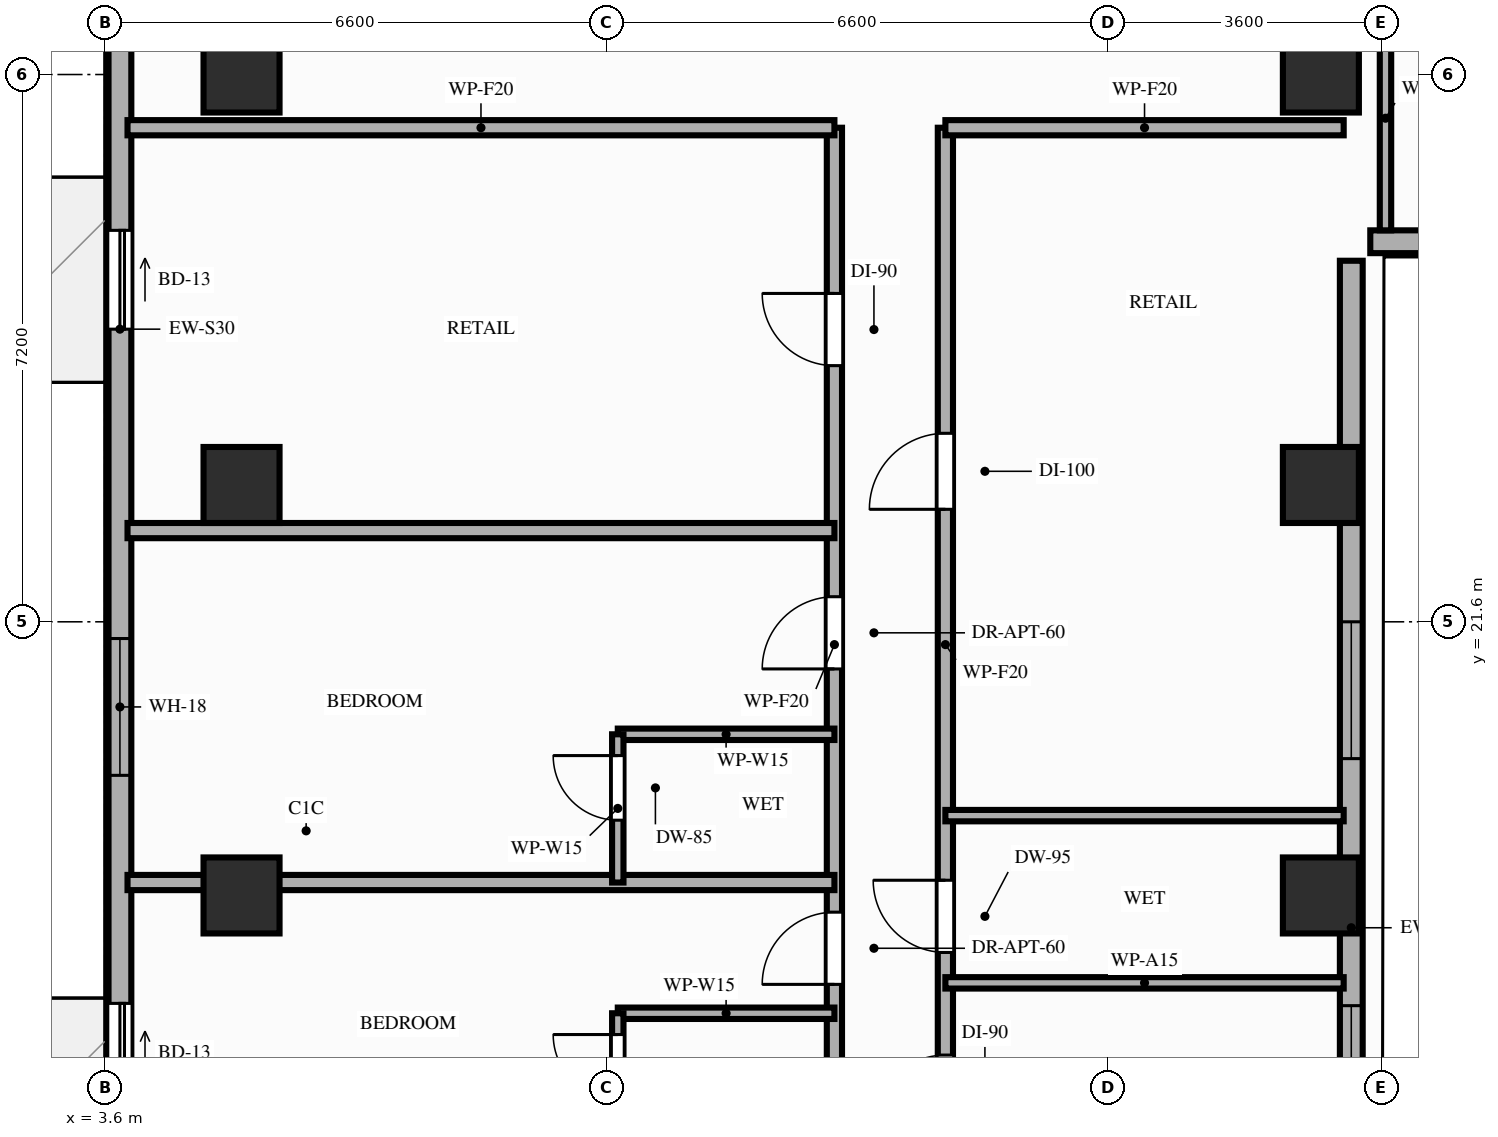
"""IFC4 building model, lengths in metres.
Left out: names, types, materials, properties, quantities, classifications, styles, units other than length and angle.
Written with IfcOpenShell. Run it as: python <this file> out.ifc"""

import sys

from ifc_helpers import new_model, si_unit, direction, frame, frame_2d, origin, origin_2d, place, context, subcontext, project, spatial, rectangle, extrude, element, fill, save


model = new_model("IFC4")
c1 = context("Model", 3, precision=1e-05, world=origin(), true_north=direction((0.0, 1.0)))
c2 = subcontext(c1, "Body", "Model", "MODEL_VIEW")
j1 = project(units=[si_unit("LENGTHUNIT", "METRE"), si_unit("PLANEANGLEUNIT", "RADIAN")], contexts=[c1])
p1 = place(None, origin())
s1 = spatial("IfcSite", under=j1, at=p1, CompositionType="ELEMENT")
p2 = place(p1, origin())
s2 = spatial("IfcBuilding", under=s1, at=p2, CompositionType="ELEMENT")
p3 = place(p2, frame((0.0, 0.0, 136.2)))
s3 = spatial("IfcBuildingStorey", under=s2, at=p3, CompositionType="ELEMENT", Elevation=136.2)
for number, where, z_axis, x_axis in (
    (1, (5.4, 18.0, 0.0), (0.0, 0.0, 1.0), (1.0, 0.0, 0.0)),
    (2, (19.6, 18.0, 0.0), (0.0, 0.0, 1.0), (1.0, 0.0, 0.0)),
    (3, (5.4, 23.4, 0.0), (0.0, 0.0, 1.0), (1.0, 0.0, 0.0)),
    (4, (19.6, 23.4, 0.0), (0.0, 0.0, 1.0), (1.0, 0.0, 0.0)),
    (5, (5.4, 28.8, 0.0), (0.0, 0.0, 1.0), (1.0, 0.0, 0.0)),
    (6, (19.6, 28.8, 0.0), (0.0, 0.0, 1.0), (1.0, 0.0, 0.0)),
):
    element("IfcColumn", number, at=place(p3, frame(where, z_axis=z_axis, x_axis=x_axis)), inside=s3, PredefinedType="COLUMN", context=c2, shape_type="SweptSolid", body=[
        extrude(rectangle(XDim=1.0, YDim=1.0, at=origin_2d()), origin(), (0.0, 0.0, 1.0), 3.2),
    ])
p4 = place(p3, frame((3.8, 42.1, 0.0), z_axis=(0.0, 0.0, 1.0), x_axis=(0.0, -1.0, 0.0)))
e7 = element("IfcWall", 7, at=p4, inside=s3, PredefinedType="STANDARD", context=c2, shape_type="SweptSolid", body=[
    extrude(rectangle(XDim=33.3, YDim=0.3, at=frame_2d((16.65, 0.0))), origin(), (0.0, 0.0, 1.0), 2.71),
])
p5 = place(p4, frame((25.52, 0.0, 0.0)))
e8 = element("IfcOpeningElement", 8, at=p5, cuts=e7, PredefinedType="OPENING", context=c2, shape_type="SweptSolid", body=[
    extrude(rectangle(XDim=1.3, YDim=2.08, at=frame_2d((0.65, 1.04))), frame((0.0, 0.16, 0.0), z_axis=(0.0, -1.0, 0.0), x_axis=(1.0, 0.0, 0.0)), (0.0, 0.0, 1.0), 0.32),
])
p6 = place(p4, frame((15.35, 0.0, 0.0)))
e9 = element("IfcOpeningElement", 9, at=p6, cuts=e7, PredefinedType="OPENING", context=c2, shape_type="SweptSolid", body=[
    extrude(rectangle(XDim=1.3, YDim=2.08, at=frame_2d((0.65, 1.04))), frame((0.0, 0.16, 0.0), z_axis=(0.0, -1.0, 0.0), x_axis=(1.0, 0.0, 0.0)), (0.0, 0.0, 1.0), 0.32),
])
p7 = place(p4, frame((20.72, 0.0, 0.85)))
e10 = element("IfcOpeningElement", 10, at=p7, cuts=e7, PredefinedType="OPENING", context=c2, shape_type="SweptSolid", body=[
    extrude(rectangle(XDim=1.8, YDim=1.61, at=frame_2d((0.9, 0.805))), frame((0.0, 0.16, 0.0), z_axis=(0.0, -1.0, 0.0), x_axis=(1.0, 0.0, 0.0)), (0.0, 0.0, 1.0), 0.32),
])
p8 = place(p4, frame((29.48, 0.0, 0.85)))
e11 = element("IfcOpeningElement", 11, at=p8, cuts=e7, PredefinedType="OPENING", context=c2, shape_type="SweptSolid", body=[
    extrude(rectangle(XDim=1.8, YDim=1.61, at=frame_2d((0.9, 0.805))), frame((0.0, 0.16, 0.0), z_axis=(0.0, -1.0, 0.0), x_axis=(1.0, 0.0, 0.0)), (0.0, 0.0, 1.0), 0.32),
])
p9 = place(p4, frame((9.9, 0.0, 0.85)))
e12 = element("IfcOpeningElement", 12, at=p9, cuts=e7, PredefinedType="OPENING", context=c2, shape_type="SweptSolid", body=[
    extrude(rectangle(XDim=1.8, YDim=1.61, at=frame_2d((0.9, 0.805))), frame((0.0, 0.16, 0.0), z_axis=(0.0, -1.0, 0.0), x_axis=(1.0, 0.0, 0.0)), (0.0, 0.0, 1.0), 0.32),
])
p10 = place(p4, frame((3.8, 0.0, 0.85)))
e13 = element("IfcOpeningElement", 13, at=p10, cuts=e7, PredefinedType="OPENING", context=c2, shape_type="SweptSolid", body=[
    extrude(rectangle(XDim=1.8, YDim=1.61, at=frame_2d((0.9, 0.805))), frame((0.0, 0.16, 0.0), z_axis=(0.0, -1.0, 0.0), x_axis=(1.0, 0.0, 0.0)), (0.0, 0.0, 1.0), 0.32),
])
p11 = place(p3, frame((20.0, 8.8, 0.0), z_axis=(0.0, 0.0, 1.0), x_axis=(0.0, 1.0, 0.0)))
e14 = element("IfcWall", 14, at=p11, inside=s3, PredefinedType="STANDARD", context=c2, shape_type="SweptSolid", body=[
    extrude(rectangle(XDim=17.55, YDim=0.3, at=frame_2d((8.775, 0.0))), origin(), (0.0, 0.0, 1.0), 2.45),
])
p12 = place(p11, frame((5.95, 0.0, 0.85)))
e15 = element("IfcOpeningElement", 15, at=p12, cuts=e14, PredefinedType="OPENING", context=c2, shape_type="SweptSolid", body=[
    extrude(rectangle(XDim=1.8, YDim=1.35, at=frame_2d((0.9, 0.675))), frame((0.0, 0.16, 0.0), z_axis=(0.0, -1.0, 0.0), x_axis=(1.0, 0.0, 0.0)), (0.0, 0.0, 1.0), 0.32),
])
p13 = place(p11, frame((11.0, 0.0, 0.85)))
e16 = element("IfcOpeningElement", 16, at=p13, cuts=e14, PredefinedType="OPENING", context=c2, shape_type="SweptSolid", body=[
    extrude(rectangle(XDim=1.8, YDim=1.35, at=frame_2d((0.9, 0.675))), frame((0.0, 0.16, 0.0), z_axis=(0.0, -1.0, 0.0), x_axis=(1.0, 0.0, 0.0)), (0.0, 0.0, 1.0), 0.32),
])
p14 = place(p3, frame((20.25, 26.6, 0.0), z_axis=(0.0, 0.0, 1.0), x_axis=(1.0, 0.0, 0.0)))
e17 = element("IfcWall", 17, at=p14, inside=s3, PredefinedType="STANDARD", context=c2, shape_type="SweptSolid", body=[
    extrude(rectangle(XDim=26.15, YDim=0.3, at=frame_2d((13.075, 0.0))), origin(), (0.0, 0.0, 1.0), 2.71),
])
p15 = place(p14, frame((13.9, 0.0, 0.0)))
e18 = element("IfcOpeningElement", 18, at=p15, cuts=e17, PredefinedType="OPENING", context=c2, shape_type="SweptSolid", body=[
    extrude(rectangle(XDim=1.3, YDim=2.08, at=frame_2d((0.65, 1.04))), frame((0.0, 0.16, 0.0), z_axis=(0.0, -1.0, 0.0), x_axis=(1.0, 0.0, 0.0)), (0.0, 0.0, 1.0), 0.32),
])
p16 = place(p14, frame((2.25, 0.0, 0.85)))
e19 = element("IfcOpeningElement", 19, at=p16, cuts=e17, PredefinedType="OPENING", context=c2, shape_type="SweptSolid", body=[
    extrude(rectangle(XDim=1.8, YDim=1.61, at=frame_2d((0.9, 0.805))), frame((0.0, 0.16, 0.0), z_axis=(0.0, -1.0, 0.0), x_axis=(1.0, 0.0, 0.0)), (0.0, 0.0, 1.0), 0.32),
])
p17 = place(p14, frame((7.75, 0.0, 0.85)))
e20 = element("IfcOpeningElement", 20, at=p17, cuts=e17, PredefinedType="OPENING", context=c2, shape_type="SweptSolid", body=[
    extrude(rectangle(XDim=1.8, YDim=1.61, at=frame_2d((0.9, 0.805))), frame((0.0, 0.16, 0.0), z_axis=(0.0, -1.0, 0.0), x_axis=(1.0, 0.0, 0.0)), (0.0, 0.0, 1.0), 0.32),
])
p18 = place(p14, frame((22.25, 0.0, 0.85)))
e21 = element("IfcOpeningElement", 21, at=p18, cuts=e17, PredefinedType="OPENING", context=c2, shape_type="SweptSolid", body=[
    extrude(rectangle(XDim=1.8, YDim=1.61, at=frame_2d((0.9, 0.805))), frame((0.0, 0.16, 0.0), z_axis=(0.0, -1.0, 0.0), x_axis=(1.0, 0.0, 0.0)), (0.0, 0.0, 1.0), 0.32),
])
p19 = place(p3, frame((13.2, 14.5, 0.0), z_axis=(0.0, 0.0, 1.0), x_axis=(0.0, 1.0, 0.0)))
e22 = element("IfcWall", 22, at=p19, inside=s3, PredefinedType="PARTITIONING", context=c2, shape_type="SweptSolid", body=[
    extrude(rectangle(XDim=13.6, YDim=0.2, at=frame_2d((6.8, 0.0))), origin(), (0.0, 0.0, 1.0), 2.45),
])
p20 = place(p19, frame((2.33, 0.0, 0.0)))
e23 = element("IfcOpeningElement", 23, at=p20, cuts=e22, PredefinedType="OPENING", context=c2, shape_type="SweptSolid", body=[
    extrude(rectangle(XDim=0.95, YDim=2.15, at=frame_2d((0.475, 1.075))), frame((0.0, 0.11, 0.0), z_axis=(0.0, -1.0, 0.0), x_axis=(1.0, 0.0, 0.0)), (0.0, 0.0, 1.0), 0.22),
])
p21 = place(p19, frame((6.48, 0.0, 0.0)))
e24 = element("IfcOpeningElement", 24, at=p21, cuts=e22, PredefinedType="OPENING", context=c2, shape_type="SweptSolid", body=[
    extrude(rectangle(XDim=0.95, YDim=2.15, at=frame_2d((0.475, 1.075))), frame((0.0, 0.11, 0.0), z_axis=(0.0, -1.0, 0.0), x_axis=(1.0, 0.0, 0.0)), (0.0, 0.0, 1.0), 0.22),
])
p22 = place(p19, frame((10.47, 0.0, 0.0)))
e25 = element("IfcOpeningElement", 25, at=p22, cuts=e22, PredefinedType="OPENING", context=c2, shape_type="SweptSolid", body=[
    extrude(rectangle(XDim=0.95, YDim=2.15, at=frame_2d((0.475, 1.075))), frame((0.0, 0.11, 0.0), z_axis=(0.0, -1.0, 0.0), x_axis=(1.0, 0.0, 0.0)), (0.0, 0.0, 1.0), 0.22),
])
p23 = place(p3, frame((14.66, 14.5, 0.0), z_axis=(0.0, 0.0, 1.0), x_axis=(0.0, 1.0, 0.0)))
e26 = element("IfcWall", 26, at=p23, inside=s3, PredefinedType="PARTITIONING", context=c2, shape_type="SweptSolid", body=[
    extrude(rectangle(XDim=13.6, YDim=0.2, at=frame_2d((6.8, 0.0))), origin(), (0.0, 0.0, 1.0), 2.45),
])
p24 = place(p23, frame((0.45, 0.0, 0.0)))
e27 = element("IfcOpeningElement", 27, at=p24, cuts=e26, PredefinedType="OPENING", context=c2, shape_type="SweptSolid", body=[
    extrude(rectangle(XDim=0.95, YDim=2.15, at=frame_2d((0.475, 1.075))), frame((0.0, 0.11, 0.0), z_axis=(0.0, -1.0, 0.0), x_axis=(1.0, 0.0, 0.0)), (0.0, 0.0, 1.0), 0.22),
])
p25 = place(p23, frame((2.75, 0.0, 0.0)))
e28 = element("IfcOpeningElement", 28, at=p25, cuts=e26, PredefinedType="OPENING", context=c2, shape_type="SweptSolid", body=[
    extrude(rectangle(XDim=0.95, YDim=2.1, at=frame_2d((0.475, 1.05))), frame((0.0, 0.11, 0.0), z_axis=(0.0, -1.0, 0.0), x_axis=(1.0, 0.0, 0.0)), (0.0, 0.0, 1.0), 0.22),
])
p26 = place(p23, frame((8.58, 0.0, 0.0)))
e29 = element("IfcOpeningElement", 29, at=p26, cuts=e26, PredefinedType="OPENING", context=c2, shape_type="SweptSolid", body=[
    extrude(rectangle(XDim=1.0, YDim=2.15, at=frame_2d((0.5, 1.075))), frame((0.0, 0.11, 0.0), z_axis=(0.0, -1.0, 0.0), x_axis=(1.0, 0.0, 0.0)), (0.0, 0.0, 1.0), 0.22),
])
p27 = place(p3, frame((3.9, 28.1, 0.0), z_axis=(0.0, 0.0, 1.0), x_axis=(1.0, 0.0, 0.0)))
e30 = element("IfcWall", 30, at=p27, inside=s3, PredefinedType="PARTITIONING", context=c2, shape_type="SweptSolid", body=[
    extrude(rectangle(XDim=9.3, YDim=0.2, at=frame_2d((4.65, 0.0))), origin(), (0.0, 0.0, 1.0), 2.45),
])
p28 = place(p3, frame((14.66, 28.1, 0.0), z_axis=(0.0, 0.0, 1.0), x_axis=(1.0, 0.0, 0.0)))
e31 = element("IfcWall", 31, at=p28, inside=s3, PredefinedType="PARTITIONING", context=c2, shape_type="SweptSolid", body=[
    extrude(rectangle(XDim=5.24, YDim=0.2, at=frame_2d((2.62, 0.0))), origin(), (0.0, 0.0, 1.0), 2.45),
])
p29 = place(p3, frame((20.45, 26.75, 0.0), z_axis=(0.0, 0.0, 1.0), x_axis=(0.0, 1.0, 0.0)))
e32 = element("IfcWall", 32, at=p29, inside=s3, PredefinedType="PARTITIONING", context=c2, shape_type="SweptSolid", body=[
    extrude(rectangle(XDim=2.95, YDim=0.15, at=frame_2d((1.475, 0.0))), origin(), (0.0, 0.0, 1.0), 2.45),
])
p30 = place(p3, frame((10.35, 16.45, 0.0), z_axis=(0.0, 0.0, 1.0), x_axis=(1.0, 0.0, 0.0)))
e33 = element("IfcWall", 33, at=p30, inside=s3, PredefinedType="PARTITIONING", context=c2, shape_type="SweptSolid", body=[
    extrude(rectangle(XDim=2.85, YDim=0.15, at=frame_2d((1.425, 0.0))), origin(), (0.0, 0.0, 1.0), 2.61),
])
p31 = place(p3, frame((10.35, 14.5, 0.0), z_axis=(0.0, 0.0, 1.0), x_axis=(0.0, 1.0, 0.0)))
e34 = element("IfcWall", 34, at=p31, inside=s3, PredefinedType="PARTITIONING", context=c2, shape_type="SweptSolid", body=[
    extrude(rectangle(XDim=1.95, YDim=0.15, at=frame_2d((0.975, 0.0))), origin(), (0.0, 0.0, 1.0), 2.61),
])
p32 = place(p31, frame((0.82, 0.0, 0.0)))
e35 = element("IfcOpeningElement", 35, at=p32, cuts=e34, PredefinedType="OPENING", context=c2, shape_type="SweptSolid", body=[
    extrude(rectangle(XDim=0.85, YDim=2.1, at=frame_2d((0.425, 1.05))), frame((0.0, 0.085, 0.0), z_axis=(0.0, -1.0, 0.0), x_axis=(1.0, 0.0, 0.0)), (0.0, 0.0, 1.0), 0.17),
])
p33 = place(p3, frame((3.9, 18.17, 0.0), z_axis=(0.0, 0.0, 1.0), x_axis=(1.0, 0.0, 0.0)))
e36 = element("IfcWall", 36, at=p33, inside=s3, PredefinedType="PARTITIONING", context=c2, shape_type="SweptSolid", body=[
    extrude(rectangle(XDim=9.3, YDim=0.2, at=frame_2d((4.65, 0.0))), origin(), (0.0, 0.0, 1.0), 2.45),
])
p34 = place(p3, frame((10.35, 20.12, 0.0), z_axis=(0.0, 0.0, 1.0), x_axis=(1.0, 0.0, 0.0)))
e37 = element("IfcWall", 37, at=p34, inside=s3, PredefinedType="PARTITIONING", context=c2, shape_type="SweptSolid", body=[
    extrude(rectangle(XDim=2.85, YDim=0.15, at=frame_2d((1.425, 0.0))), origin(), (0.0, 0.0, 1.0), 3.02),
])
p35 = place(p3, frame((10.35, 18.17, 0.0), z_axis=(0.0, 0.0, 1.0), x_axis=(0.0, 1.0, 0.0)))
e38 = element("IfcWall", 38, at=p35, inside=s3, PredefinedType="PARTITIONING", context=c2, shape_type="SweptSolid", body=[
    extrude(rectangle(XDim=1.95, YDim=0.15, at=frame_2d((0.975, 0.0))), origin(), (0.0, 0.0, 1.0), 2.45),
])
p36 = place(p35, frame((0.82, 0.0, 0.0)))
e39 = element("IfcOpeningElement", 39, at=p36, cuts=e38, PredefinedType="OPENING", context=c2, shape_type="SweptSolid", body=[
    extrude(rectangle(XDim=0.85, YDim=2.1, at=frame_2d((0.425, 1.05))), frame((0.0, 0.085, 0.0), z_axis=(0.0, -1.0, 0.0), x_axis=(1.0, 0.0, 0.0)), (0.0, 0.0, 1.0), 0.17),
])
p37 = place(p3, frame((3.9, 22.8, 0.0), z_axis=(0.0, 0.0, 1.0), x_axis=(1.0, 0.0, 0.0)))
e40 = element("IfcWall", 40, at=p37, inside=s3, PredefinedType="PARTITIONING", context=c2, shape_type="SweptSolid", body=[
    extrude(rectangle(XDim=9.3, YDim=0.2, at=frame_2d((4.65, 0.0))), origin(), (0.0, 0.0, 1.0), 2.45),
])
for number, where, z_axis, x_axis in (
    (41, (14.66, 16.85, 0.0), (0.0, 0.0, 1.0), (1.0, 0.0, 0.0)),
    (42, (14.66, 19.05, 0.0), (0.0, 0.0, 1.0), (1.0, 0.0, 0.0)),
):
    element("IfcWall", number, at=place(p3, frame(where, z_axis=z_axis, x_axis=x_axis)), inside=s3, PredefinedType="PARTITIONING", context=c2, shape_type="SweptSolid", body=[
        extrude(rectangle(XDim=5.24, YDim=0.15, at=frame_2d((2.62, 0.0))), origin(), (0.0, 0.0, 1.0), 2.45),
    ])
p38 = place(p5, origin())
e43 = element("IfcDoor", 43, at=p38, inside=s3, OperationType="SLIDING_TO_LEFT", PredefinedType="DOOR", context=c2, shape_type="SweptSolid", body=[
    extrude(rectangle(XDim=1.3, YDim=2.08, at=frame_2d((0.65, 1.04))), frame((0.0, 0.025, 0.0), z_axis=(0.0, -1.0, 0.0), x_axis=(1.0, 0.0, 0.0)), (0.0, 0.0, 1.0), 0.05),
])
fill(e8, e43)
p39 = place(p6, origin())
e44 = element("IfcDoor", 44, at=p39, inside=s3, OperationType="SLIDING_TO_LEFT", PredefinedType="DOOR", context=c2, shape_type="SweptSolid", body=[
    extrude(rectangle(XDim=1.3, YDim=2.08, at=frame_2d((0.65, 1.04))), frame((0.0, 0.025, 0.0), z_axis=(0.0, -1.0, 0.0), x_axis=(1.0, 0.0, 0.0)), (0.0, 0.0, 1.0), 0.05),
])
fill(e9, e44)
p40 = place(p7, origin())
e45 = element("IfcWindow", 45, at=p40, inside=s3, PartitioningType="SINGLE_PANEL", PredefinedType="WINDOW", context=c2, shape_type="SweptSolid", body=[
    extrude(rectangle(XDim=1.8, YDim=1.61, at=frame_2d((0.9, 0.805))), frame((0.0, 0.03, 0.0), z_axis=(0.0, -1.0, 0.0), x_axis=(1.0, 0.0, 0.0)), (0.0, 0.0, 1.0), 0.06),
])
fill(e10, e45)
p41 = place(p12, origin())
e46 = element("IfcWindow", 46, at=p41, inside=s3, PartitioningType="SINGLE_PANEL", PredefinedType="WINDOW", context=c2, shape_type="SweptSolid", body=[
    extrude(rectangle(XDim=1.8, YDim=1.35, at=frame_2d((0.9, 0.675))), frame((0.0, 0.03, 0.0), z_axis=(0.0, -1.0, 0.0), x_axis=(1.0, 0.0, 0.0)), (0.0, 0.0, 1.0), 0.06),
])
fill(e15, e46)
p42 = place(p13, origin())
e47 = element("IfcWindow", 47, at=p42, inside=s3, PartitioningType="SINGLE_PANEL", PredefinedType="WINDOW", context=c2, shape_type="SweptSolid", body=[
    extrude(rectangle(XDim=1.8, YDim=1.35, at=frame_2d((0.9, 0.675))), frame((0.0, 0.03, 0.0), z_axis=(0.0, -1.0, 0.0), x_axis=(1.0, 0.0, 0.0)), (0.0, 0.0, 1.0), 0.06),
])
fill(e16, e47)
p43 = place(p32, origin())
e48 = element("IfcDoor", 48, at=p43, inside=s3, OperationType="SINGLE_SWING_RIGHT", PredefinedType="DOOR", context=c2, shape_type="SweptSolid", body=[
    extrude(rectangle(XDim=0.85, YDim=2.1, at=frame_2d((0.425, 1.05))), frame((0.0, 0.025, 0.0), z_axis=(0.0, -1.0, 0.0), x_axis=(1.0, 0.0, 0.0)), (0.0, 0.0, 1.0), 0.05),
])
fill(e35, e48)
p44 = place(p20, origin())
e49 = element("IfcDoor", 49, at=p44, inside=s3, OperationType="SINGLE_SWING_LEFT", PredefinedType="DOOR", context=c2, shape_type="SweptSolid", body=[
    extrude(rectangle(XDim=0.95, YDim=2.15, at=frame_2d((0.475, 1.075))), frame((0.0, 0.025, 0.0), z_axis=(0.0, -1.0, 0.0), x_axis=(1.0, 0.0, 0.0)), (0.0, 0.0, 1.0), 0.05),
])
fill(e23, e49)
p45 = place(p36, origin())
e50 = element("IfcDoor", 50, at=p45, inside=s3, OperationType="SINGLE_SWING_RIGHT", PredefinedType="DOOR", context=c2, shape_type="SweptSolid", body=[
    extrude(rectangle(XDim=0.85, YDim=2.1, at=frame_2d((0.425, 1.05))), frame((0.0, 0.025, 0.0), z_axis=(0.0, -1.0, 0.0), x_axis=(1.0, 0.0, 0.0)), (0.0, 0.0, 1.0), 0.05),
])
fill(e39, e50)
p46 = place(p21, origin())
e51 = element("IfcDoor", 51, at=p46, inside=s3, OperationType="SINGLE_SWING_LEFT", PredefinedType="DOOR", context=c2, shape_type="SweptSolid", body=[
    extrude(rectangle(XDim=0.95, YDim=2.15, at=frame_2d((0.475, 1.075))), frame((0.0, 0.025, 0.0), z_axis=(0.0, -1.0, 0.0), x_axis=(1.0, 0.0, 0.0)), (0.0, 0.0, 1.0), 0.05),
])
fill(e24, e51)
p47 = place(p22, origin())
e52 = element("IfcDoor", 52, at=p47, inside=s3, OperationType="SINGLE_SWING_RIGHT", PredefinedType="DOOR", context=c2, shape_type="SweptSolid", body=[
    extrude(rectangle(XDim=0.95, YDim=2.15, at=frame_2d((0.475, 1.075))), frame((0.0, 0.025, 0.0), z_axis=(0.0, -1.0, 0.0), x_axis=(1.0, 0.0, 0.0)), (0.0, 0.0, 1.0), 0.05),
])
fill(e25, e52)
p48 = place(p24, origin())
e53 = element("IfcDoor", 53, at=p48, inside=s3, OperationType="SINGLE_SWING_LEFT", PredefinedType="DOOR", context=c2, shape_type="SweptSolid", body=[
    extrude(rectangle(XDim=0.95, YDim=2.15, at=frame_2d((0.475, 1.075))), frame((0.0, 0.025, 0.0), z_axis=(0.0, -1.0, 0.0), x_axis=(1.0, 0.0, 0.0)), (0.0, 0.0, 1.0), 0.05),
])
fill(e27, e53)
p49 = place(p25, origin())
e54 = element("IfcDoor", 54, at=p49, inside=s3, OperationType="SINGLE_SWING_RIGHT", PredefinedType="DOOR", context=c2, shape_type="SweptSolid", body=[
    extrude(rectangle(XDim=0.95, YDim=2.1, at=frame_2d((0.475, 1.05))), frame((0.0, 0.025, 0.0), z_axis=(0.0, -1.0, 0.0), x_axis=(1.0, 0.0, 0.0)), (0.0, 0.0, 1.0), 0.05),
])
fill(e28, e54)
p50 = place(p26, origin())
e55 = element("IfcDoor", 55, at=p50, inside=s3, OperationType="SINGLE_SWING_LEFT", PredefinedType="DOOR", context=c2, shape_type="SweptSolid", body=[
    extrude(rectangle(XDim=1.0, YDim=2.15, at=frame_2d((0.5, 1.075))), frame((0.0, 0.025, 0.0), z_axis=(0.0, -1.0, 0.0), x_axis=(1.0, 0.0, 0.0)), (0.0, 0.0, 1.0), 0.05),
])
fill(e29, e55)
save(model, sys.argv[1])
